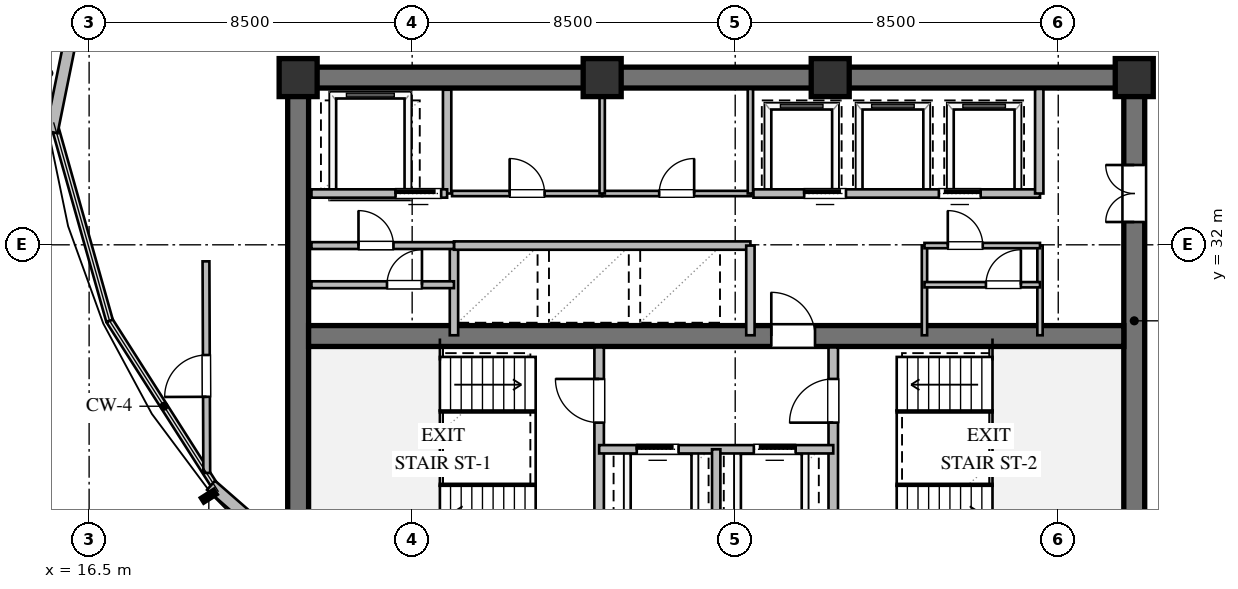
"""IFC4 building model, lengths in metres.
Left out: names, types, materials, properties, quantities, classifications, styles, units other than length and angle.
Written with IfcOpenShell. Run it as: python <this file> out.ifc"""

import sys

from ifc_helpers import new_model, si_unit, direction, frame, frame_2d, origin, origin_2d, place, context, subcontext, project, spatial, rectangle, extrude, element, fill, save


model = new_model("IFC4")
c1 = context("Model", 3, precision=1e-05, world=origin(), true_north=direction((0.0, 1.0)))
c2 = subcontext(c1, "Body", "Model", "MODEL_VIEW")
j1 = project(units=[si_unit("LENGTHUNIT", "METRE"), si_unit("PLANEANGLEUNIT", "RADIAN")], contexts=[c1])
p1 = place(None, origin())
s1 = spatial("IfcSite", under=j1, at=p1, CompositionType="ELEMENT")
p2 = place(p1, origin())
s2 = spatial("IfcBuilding", under=s1, at=p2, CompositionType="ELEMENT")
p3 = place(p2, frame((0.0, 0.0, 135.0)))
s3 = spatial("IfcBuildingStorey", under=s2, at=p3, CompositionType="ELEMENT", Elevation=135.0)
p4 = place(p3, frame((21.725, 36.4, 0.0), z_axis=(0.0, 0.0, 1.0), x_axis=(1.0, 0.0, 0.0)))
e1 = element("IfcWall", 1, at=p4, inside=s3, PredefinedType="SHEAR", context=c2, shape_type="SweptSolid", body=[
    extrude(rectangle(XDim=22.55, YDim=0.55, at=frame_2d((11.275, 0.0))), origin(), (0.0, 0.0, 1.0), 3.36),
])
p5 = place(p3, frame((22.0, 23.875, 0.0), z_axis=(0.0, 0.0, 1.0), x_axis=(0.0, 1.0, 0.0)))
e2 = element("IfcWall", 2, at=p5, inside=s3, PredefinedType="SHEAR", context=c2, shape_type="SweptSolid", body=[
    extrude(rectangle(XDim=12.25, YDim=0.55, at=frame_2d((6.125, 0.0))), origin(), (0.0, 0.0, 1.0), 3.36),
])
p6 = place(p3, frame((44.0, 23.875, 0.0), z_axis=(0.0, 0.0, 1.0), x_axis=(0.0, 1.0, 0.0)))
e3 = element("IfcWall", 3, at=p6, inside=s3, PredefinedType="SHEAR", context=c2, shape_type="SweptSolid", body=[
    extrude(rectangle(XDim=12.25, YDim=0.55, at=frame_2d((6.125, 0.0))), origin(), (0.0, 0.0, 1.0), 3.36),
])
p7 = place(p6, frame((8.725, 0.0, 0.0)))
e4 = element("IfcOpeningElement", 4, at=p7, cuts=e3, PredefinedType="OPENING", context=c2, shape_type="SweptSolid", body=[
    extrude(rectangle(XDim=1.5, YDim=2.15, at=frame_2d((0.75, 1.075))), frame((0.0, 0.285, 0.0), z_axis=(0.0, -1.0, 0.0), x_axis=(1.0, 0.0, 0.0)), (0.0, 0.0, 1.0), 0.57),
])
p8 = place(p3, frame((22.275, 29.6, 0.0), z_axis=(0.0, 0.0, 1.0), x_axis=(1.0, 0.0, 0.0)))
e5 = element("IfcWall", 5, at=p8, inside=s3, PredefinedType="SHEAR", context=c2, shape_type="SweptSolid", body=[
    extrude(rectangle(XDim=21.45, YDim=0.55, at=frame_2d((10.725, 0.0))), origin(), (0.0, 0.0, 1.0), 3.36),
])
p9 = place(p8, frame((12.175, 0.0, 0.0)))
e6 = element("IfcOpeningElement", 6, at=p9, cuts=e5, PredefinedType="OPENING", context=c2, shape_type="SweptSolid", body=[
    extrude(rectangle(XDim=1.15, YDim=2.1, at=frame_2d((0.575, 1.05))), frame((0.0, 0.285, 0.0), z_axis=(0.0, -1.0, 0.0), x_axis=(1.0, 0.0, 0.0)), (0.0, 0.0, 1.0), 0.57),
])
for number, where, z_axis, x_axis in (
    (7, (44.0, 36.4, 0.0), (0.0, 0.0, 1.0), (1.0, 0.0, 0.0)),
    (8, (36.0, 36.4, 0.0), (0.0, 0.0, 1.0), (1.0, 0.0, 0.0)),
    (9, (30.0, 36.4, 0.0), (0.0, 0.0, 1.0), (1.0, 0.0, 0.0)),
    (10, (22.0, 36.4, 0.0), (0.0, 0.0, 1.0), (1.0, 0.0, 0.0)),
):
    element("IfcColumn", number, at=place(p3, frame(where, z_axis=z_axis, x_axis=x_axis)), inside=s3, PredefinedType="COLUMN", context=c2, shape_type="SweptSolid", body=[
        extrude(rectangle(XDim=1.0, YDim=1.0, at=origin_2d()), origin(), (0.0, 0.0, 1.0), 3.6),
    ])
p10 = place(p3, frame((24.225, 21.727, 0.0), z_axis=(0.0, 0.0, 1.0), x_axis=(-0.753105964003, 0.657899237713, 0.0)))
e11 = element("IfcWall", 11, at=p10, inside=s3, PredefinedType="STANDARD", context=c2, shape_type="SweptSolid", body=[
    extrude(rectangle(XDim=5.998, YDim=0.32, at=frame_2d((2.999, 0.0))), origin(), (0.0, 0.0, 1.0), 2.35),
])
p11 = place(p3, frame((15.514, 34.967, 0.0), z_axis=(0.0, 0.0, 1.0), x_axis=(0.198370893133, 0.980127026848, 0.0)))
e12 = element("IfcWall", 12, at=p11, inside=s3, PredefinedType="STANDARD", context=c2, shape_type="SweptSolid", body=[
    extrude(rectangle(XDim=14.469, YDim=0.32, at=frame_2d((7.234, 0.0))), origin(), (0.0, 0.0, 1.0), 3.36),
])
p12 = place(p3, frame((29.92, 23.9, 0.0), z_axis=(0.0, 0.0, 1.0), x_axis=(0.0, 1.0, 0.0)))
e13 = element("IfcWall", 13, at=p12, inside=s3, PredefinedType="SOLIDWALL", context=c2, shape_type="SweptSolid", body=[
    extrude(rectangle(XDim=5.4, YDim=0.25, at=frame_2d((2.7, 0.0))), origin(), (0.0, 0.0, 1.0), 2.89),
])
p13 = place(p12, frame((3.421, 0.0, 0.0)))
e14 = element("IfcOpeningElement", 14, at=p13, cuts=e13, PredefinedType="OPENING", context=c2, shape_type="SweptSolid", body=[
    extrude(rectangle(XDim=1.15, YDim=2.1, at=frame_2d((0.575, 1.05))), frame((0.0, 0.135, 0.0), z_axis=(0.0, -1.0, 0.0), x_axis=(1.0, 0.0, 0.0)), (0.0, 0.0, 1.0), 0.27),
])
p14 = place(p3, frame((36.08, 23.9, 0.0), z_axis=(0.0, 0.0, 1.0), x_axis=(0.0, 1.0, 0.0)))
e15 = element("IfcWall", 15, at=p14, inside=s3, PredefinedType="SOLIDWALL", context=c2, shape_type="SweptSolid", body=[
    extrude(rectangle(XDim=5.4, YDim=0.25, at=frame_2d((2.7, 0.0))), origin(), (0.0, 0.0, 1.0), 3.36),
])
p15 = place(p14, frame((3.421, 0.0, 0.0)))
e16 = element("IfcOpeningElement", 16, at=p15, cuts=e15, PredefinedType="OPENING", context=c2, shape_type="SweptSolid", body=[
    extrude(rectangle(XDim=1.15, YDim=2.1, at=frame_2d((0.575, 1.05))), frame((0.0, 0.135, 0.0), z_axis=(0.0, -1.0, 0.0), x_axis=(1.0, 0.0, 0.0)), (0.0, 0.0, 1.0), 0.27),
])
p16 = place(p3, frame((29.92, 26.62, 0.0), z_axis=(0.0, 0.0, 1.0), x_axis=(1.0, 0.0, 0.0)))
e17 = element("IfcWall", 17, at=p16, inside=s3, PredefinedType="SOLIDWALL", context=c2, shape_type="SweptSolid", body=[
    extrude(rectangle(XDim=6.16, YDim=0.22, at=frame_2d((3.08, 0.0))), origin(), (0.0, 0.0, 1.0), 3.36),
])
p17 = place(p16, frame((0.99, 0.0, 0.0)))
e18 = element("IfcOpeningElement", 18, at=p17, cuts=e17, PredefinedType="OPENING", context=c2, shape_type="SweptSolid", body=[
    extrude(rectangle(XDim=1.1, YDim=2.1, at=frame_2d((0.55, 1.05))), frame((0.0, 0.12, 0.0), z_axis=(0.0, -1.0, 0.0), x_axis=(1.0, 0.0, 0.0)), (0.0, 0.0, 1.0), 0.24),
])
p18 = place(p16, frame((4.07, 0.0, 0.0)))
e19 = element("IfcOpeningElement", 19, at=p18, cuts=e17, PredefinedType="OPENING", context=c2, shape_type="SweptSolid", body=[
    extrude(rectangle(XDim=1.1, YDim=2.1, at=frame_2d((0.55, 1.05))), frame((0.0, 0.12, 0.0), z_axis=(0.0, -1.0, 0.0), x_axis=(1.0, 0.0, 0.0)), (0.0, 0.0, 1.0), 0.24),
])
p19 = place(p3, frame((33.0, 23.9, 0.0), z_axis=(0.0, 0.0, 1.0), x_axis=(0.0, 1.0, 0.0)))
e20 = element("IfcWall", 20, at=p19, inside=s3, PredefinedType="SOLIDWALL", context=c2, shape_type="SweptSolid", body=[
    extrude(rectangle(XDim=2.72, YDim=0.22, at=frame_2d((1.36, 0.0))), origin(), (0.0, 0.0, 1.0), 3.36),
])
p20 = place(p3, frame((25.92, 33.35, 0.0), z_axis=(0.0, 0.0, 1.0), x_axis=(0.0, 1.0, 0.0)))
e21 = element("IfcWall", 21, at=p20, inside=s3, PredefinedType="SOLIDWALL", context=c2, shape_type="SweptSolid", body=[
    extrude(rectangle(XDim=2.73, YDim=0.22, at=frame_2d((1.365, 0.0))), origin(), (0.0, 0.0, 1.0), 3.36),
])
p21 = place(p3, frame((22.35, 33.35, 0.0), z_axis=(0.0, 0.0, 1.0), x_axis=(1.0, 0.0, 0.0)))
e22 = element("IfcWall", 22, at=p21, inside=s3, PredefinedType="SOLIDWALL", context=c2, shape_type="SweptSolid", body=[
    extrude(rectangle(XDim=3.57, YDim=0.22, at=frame_2d((1.785, 0.0))), origin(), (0.0, 0.0, 1.0), 3.36),
])
p22 = place(p21, frame((2.213, 0.0, 0.0)))
e23 = element("IfcOpeningElement", 23, at=p22, cuts=e22, PredefinedType="OPENING", context=c2, shape_type="SweptSolid", body=[
    extrude(rectangle(XDim=1.2, YDim=2.1, at=frame_2d((0.6, 1.05))), frame((0.0, 0.12, 0.0), z_axis=(0.0, -1.0, 0.0), x_axis=(1.0, 0.0, 0.0)), (0.0, 0.0, 1.0), 0.24),
])
p23 = place(p3, frame((26.1, 29.62, 0.0), z_axis=(0.0, 0.0, 1.0), x_axis=(0.0, 1.0, 0.0)))
e24 = element("IfcWall", 24, at=p23, inside=s3, PredefinedType="SOLIDWALL", context=c2, shape_type="SweptSolid", body=[
    extrude(rectangle(XDim=2.36, YDim=0.22, at=frame_2d((1.18, 0.0))), origin(), (0.0, 0.0, 1.0), 3.36),
])
p24 = place(p3, frame((26.1, 31.98, 0.0), z_axis=(0.0, 0.0, 1.0), x_axis=(1.0, 0.0, 0.0)))
e25 = element("IfcWall", 25, at=p24, inside=s3, PredefinedType="SOLIDWALL", context=c2, shape_type="SweptSolid", body=[
    extrude(rectangle(XDim=7.8, YDim=0.22, at=frame_2d((3.9, 0.0))), origin(), (0.0, 0.0, 1.0), 3.36),
])
p25 = place(p3, frame((33.9, 29.62, 0.0), z_axis=(0.0, 0.0, 1.0), x_axis=(0.0, 1.0, 0.0)))
e26 = element("IfcWall", 26, at=p25, inside=s3, PredefinedType="SOLIDWALL", context=c2, shape_type="SweptSolid", body=[
    extrude(rectangle(XDim=2.36, YDim=0.22, at=frame_2d((1.18, 0.0))), origin(), (0.0, 0.0, 1.0), 3.36),
])
p26 = place(p3, frame((26.05, 33.35, 0.0), z_axis=(0.0, 0.0, 1.0), x_axis=(1.0, 0.0, 0.0)))
e27 = element("IfcWall", 27, at=p26, inside=s3, PredefinedType="PARTITIONING", context=c2, shape_type="SweptSolid", body=[
    extrude(rectangle(XDim=3.95, YDim=0.14, at=frame_2d((1.975, 0.0))), origin(), (0.0, 0.0, 1.0), 3.36),
])
p27 = place(p26, frame((1.515, 0.0, 0.0)))
e28 = element("IfcOpeningElement", 28, at=p27, cuts=e27, PredefinedType="OPENING", context=c2, shape_type="SweptSolid", body=[
    extrude(rectangle(XDim=0.92, YDim=2.1, at=frame_2d((0.46, 1.05))), frame((0.0, 0.08, 0.0), z_axis=(0.0, -1.0, 0.0), x_axis=(1.0, 0.0, 0.0)), (0.0, 0.0, 1.0), 0.16),
])
p28 = place(p3, frame((30.0, 33.35, 0.0), z_axis=(0.0, 0.0, 1.0), x_axis=(1.0, 0.0, 0.0)))
e29 = element("IfcWall", 29, at=p28, inside=s3, PredefinedType="PARTITIONING", context=c2, shape_type="SweptSolid", body=[
    extrude(rectangle(XDim=3.92, YDim=0.14, at=frame_2d((1.96, 0.0))), origin(), (0.0, 0.0, 1.0), 3.36),
])
p29 = place(p28, frame((1.5, 0.0, 0.0)))
e30 = element("IfcOpeningElement", 30, at=p29, cuts=e29, PredefinedType="OPENING", context=c2, shape_type="SweptSolid", body=[
    extrude(rectangle(XDim=0.92, YDim=2.1, at=frame_2d((0.46, 1.05))), frame((0.0, 0.08, 0.0), z_axis=(0.0, -1.0, 0.0), x_axis=(1.0, 0.0, 0.0)), (0.0, 0.0, 1.0), 0.16),
])
for number, where, z_axis, x_axis in (
    (31, (30.0, 33.35, 0.0), (0.0, 0.0, 1.0), (0.0, 1.0, 0.0)),
    (32, (33.9, 33.35, 0.0), (0.0, 0.0, 1.0), (0.0, 1.0, 0.0)),
):
    element("IfcWall", number, at=place(p3, frame(where, z_axis=z_axis, x_axis=x_axis)), inside=s3, PredefinedType="PARTITIONING", context=c2, shape_type="SweptSolid", body=[
        extrude(rectangle(XDim=2.75, YDim=0.14, at=frame_2d((1.375, 0.0))), origin(), (0.0, 0.0, 1.0), 3.36),
    ])
p30 = place(p3, frame((33.98, 33.35, 0.0), z_axis=(0.0, 0.0, 1.0), x_axis=(1.0, 0.0, 0.0)))
e33 = element("IfcWall", 33, at=p30, inside=s3, PredefinedType="SOLIDWALL", context=c2, shape_type="SweptSolid", body=[
    extrude(rectangle(XDim=7.54, YDim=0.22, at=frame_2d((3.77, 0.0))), origin(), (0.0, 0.0, 1.0), 3.36),
])
p31 = place(p30, frame((1.335, 0.0, 0.0)))
e34 = element("IfcOpeningElement", 34, at=p31, cuts=e33, PredefinedType="OPENING", context=c2, shape_type="SweptSolid", body=[
    extrude(rectangle(XDim=1.1, YDim=2.1, at=frame_2d((0.55, 1.05))), frame((0.0, 0.12, 0.0), z_axis=(0.0, -1.0, 0.0), x_axis=(1.0, 0.0, 0.0)), (0.0, 0.0, 1.0), 0.24),
])
p32 = place(p30, frame((4.879, 0.0, 0.0)))
e35 = element("IfcOpeningElement", 35, at=p32, cuts=e33, PredefinedType="OPENING", context=c2, shape_type="SweptSolid", body=[
    extrude(rectangle(XDim=1.1, YDim=2.1, at=frame_2d((0.55, 1.05))), frame((0.0, 0.12, 0.0), z_axis=(0.0, -1.0, 0.0), x_axis=(1.0, 0.0, 0.0)), (0.0, 0.0, 1.0), 0.24),
])
p33 = place(p3, frame((41.5, 33.35, 0.0), z_axis=(0.0, 0.0, 1.0), x_axis=(0.0, 1.0, 0.0)))
e36 = element("IfcWall", 36, at=p33, inside=s3, PredefinedType="SOLIDWALL", context=c2, shape_type="SweptSolid", body=[
    extrude(rectangle(XDim=2.75, YDim=0.22, at=frame_2d((1.375, 0.0))), origin(), (0.0, 0.0, 1.0), 3.36),
])
p34 = place(p3, frame((22.35, 30.95, 0.0), z_axis=(0.0, 0.0, 1.0), x_axis=(1.0, 0.0, 0.0)))
e37 = element("IfcWall", 37, at=p34, inside=s3, PredefinedType="PARTITIONING", context=c2, shape_type="SweptSolid", body=[
    extrude(rectangle(XDim=3.75, YDim=0.18, at=frame_2d((1.875, 0.0))), origin(), (0.0, 0.0, 1.0), 3.36),
])
p35 = place(p34, frame((1.988, 0.0, 0.0)))
e38 = element("IfcOpeningElement", 38, at=p35, cuts=e37, PredefinedType="OPENING", context=c2, shape_type="SweptSolid", body=[
    extrude(rectangle(XDim=0.92, YDim=2.1, at=frame_2d((0.46, 1.05))), frame((0.0, 0.1, 0.0), z_axis=(0.0, -1.0, 0.0), x_axis=(1.0, 0.0, 0.0)), (0.0, 0.0, 1.0), 0.2),
])
p36 = place(p3, frame((22.35, 31.98, 0.0), z_axis=(0.0, 0.0, 1.0), x_axis=(1.0, 0.0, 0.0)))
e39 = element("IfcWall", 39, at=p36, inside=s3, PredefinedType="PARTITIONING", context=c2, shape_type="SweptSolid", body=[
    extrude(rectangle(XDim=3.75, YDim=0.18, at=frame_2d((1.875, 0.0))), origin(), (0.0, 0.0, 1.0), 3.36),
])
p37 = place(p36, frame((1.238, 0.0, 0.0)))
e40 = element("IfcOpeningElement", 40, at=p37, cuts=e39, PredefinedType="OPENING", context=c2, shape_type="SweptSolid", body=[
    extrude(rectangle(XDim=0.92, YDim=2.1, at=frame_2d((0.46, 1.05))), frame((0.0, 0.1, 0.0), z_axis=(0.0, -1.0, 0.0), x_axis=(1.0, 0.0, 0.0)), (0.0, 0.0, 1.0), 0.2),
])
for number, where, z_axis, x_axis in (
    (41, (38.48, 29.62, 0.0), (0.0, 0.0, 1.0), (0.0, 1.0, 0.0)),
    (42, (41.52, 29.62, 0.0), (0.0, 0.0, 1.0), (0.0, 1.0, 0.0)),
):
    element("IfcWall", number, at=place(p3, frame(where, z_axis=z_axis, x_axis=x_axis)), inside=s3, PredefinedType="PARTITIONING", context=c2, shape_type="SweptSolid", body=[
        extrude(rectangle(XDim=2.36, YDim=0.14, at=frame_2d((1.18, 0.0))), origin(), (0.0, 0.0, 1.0), 3.36),
    ])
p38 = place(p3, frame((38.48, 30.95, 0.0), z_axis=(0.0, 0.0, 1.0), x_axis=(1.0, 0.0, 0.0)))
e43 = element("IfcWall", 43, at=p38, inside=s3, PredefinedType="PARTITIONING", context=c2, shape_type="SweptSolid", body=[
    extrude(rectangle(XDim=3.04, YDim=0.14, at=frame_2d((1.52, 0.0))), origin(), (0.0, 0.0, 1.0), 3.36),
])
p39 = place(p38, frame((1.617, 0.0, 0.0)))
e44 = element("IfcOpeningElement", 44, at=p39, cuts=e43, PredefinedType="OPENING", context=c2, shape_type="SweptSolid", body=[
    extrude(rectangle(XDim=0.92, YDim=2.1, at=frame_2d((0.46, 1.05))), frame((0.0, 0.08, 0.0), z_axis=(0.0, -1.0, 0.0), x_axis=(1.0, 0.0, 0.0)), (0.0, 0.0, 1.0), 0.16),
])
p40 = place(p3, frame((38.48, 31.98, 0.0), z_axis=(0.0, 0.0, 1.0), x_axis=(1.0, 0.0, 0.0)))
e45 = element("IfcWall", 45, at=p40, inside=s3, PredefinedType="PARTITIONING", context=c2, shape_type="SweptSolid", body=[
    extrude(rectangle(XDim=3.04, YDim=0.14, at=frame_2d((1.52, 0.0))), origin(), (0.0, 0.0, 1.0), 3.36),
])
p41 = place(p40, frame((0.614, 0.0, 0.0)))
e46 = element("IfcOpeningElement", 46, at=p41, cuts=e45, PredefinedType="OPENING", context=c2, shape_type="SweptSolid", body=[
    extrude(rectangle(XDim=0.92, YDim=2.1, at=frame_2d((0.46, 1.05))), frame((0.0, 0.08, 0.0), z_axis=(0.0, -1.0, 0.0), x_axis=(1.0, 0.0, 0.0)), (0.0, 0.0, 1.0), 0.16),
])
p42 = place(p3, frame((19.595, 25.997, 0.0), z_axis=(0.0, 0.0, 1.0), x_axis=(-0.003639049913, 0.999993378636, 0.0)))
e47 = element("IfcWall", 47, at=p42, inside=s3, PredefinedType="PARTITIONING", context=c2, shape_type="SweptSolid", body=[
    extrude(rectangle(XDim=5.568, YDim=0.18, at=frame_2d((2.784, 0.0))), origin(), (0.0, 0.0, 1.0), 2.657),
])
p43 = place(p42, frame((2.004, 0.0, 0.0)))
e48 = element("IfcOpeningElement", 48, at=p43, cuts=e47, PredefinedType="OPENING", context=c2, shape_type="SweptSolid", body=[
    extrude(rectangle(XDim=1.1, YDim=2.1, at=frame_2d((0.55, 1.05))), frame((0.0, 0.1, 0.0), z_axis=(0.0, -1.0, 0.0), x_axis=(1.0, 0.0, 0.0)), (0.0, 0.0, 1.0), 0.2),
])
p44 = place(p13, origin())
e49 = element("IfcDoor", 49, at=p44, inside=s3, OperationType="SINGLE_SWING_RIGHT", PredefinedType="DOOR", context=c2, shape_type="SweptSolid", body=[
    extrude(rectangle(XDim=1.15, YDim=2.1, at=frame_2d((0.575, 1.05))), frame((0.0, 0.025, 0.0), z_axis=(0.0, -1.0, 0.0), x_axis=(1.0, 0.0, 0.0)), (0.0, 0.0, 1.0), 0.05),
])
fill(e14, e49)
p45 = place(p15, origin())
e50 = element("IfcDoor", 50, at=p45, inside=s3, OperationType="SINGLE_SWING_LEFT", PredefinedType="DOOR", context=c2, shape_type="SweptSolid", body=[
    extrude(rectangle(XDim=1.15, YDim=2.1, at=frame_2d((0.575, 1.05))), frame((0.0, 0.025, 0.0), z_axis=(0.0, -1.0, 0.0), x_axis=(1.0, 0.0, 0.0)), (0.0, 0.0, 1.0), 0.05),
])
fill(e16, e50)
p46 = place(p17, origin())
e51 = element("IfcDoor", 51, at=p46, inside=s3, OperationType="SLIDING_TO_LEFT", PredefinedType="DOOR", context=c2, shape_type="SweptSolid", body=[
    extrude(rectangle(XDim=1.1, YDim=2.1, at=frame_2d((0.55, 1.05))), frame((0.0, 0.025, 0.0), z_axis=(0.0, -1.0, 0.0), x_axis=(1.0, 0.0, 0.0)), (0.0, 0.0, 1.0), 0.05),
])
fill(e18, e51)
p47 = place(p18, origin())
e52 = element("IfcDoor", 52, at=p47, inside=s3, OperationType="SLIDING_TO_RIGHT", PredefinedType="DOOR", context=c2, shape_type="SweptSolid", body=[
    extrude(rectangle(XDim=1.1, YDim=2.1, at=frame_2d((0.55, 1.05))), frame((0.0, 0.025, 0.0), z_axis=(0.0, -1.0, 0.0), x_axis=(1.0, 0.0, 0.0)), (0.0, 0.0, 1.0), 0.05),
])
fill(e19, e52)
p48 = place(p9, origin())
e53 = element("IfcDoor", 53, at=p48, inside=s3, OperationType="SINGLE_SWING_LEFT", PredefinedType="DOOR", context=c2, shape_type="SweptSolid", body=[
    extrude(rectangle(XDim=1.15, YDim=2.1, at=frame_2d((0.575, 1.05))), frame((0.0, 0.025, 0.0), z_axis=(0.0, -1.0, 0.0), x_axis=(1.0, 0.0, 0.0)), (0.0, 0.0, 1.0), 0.05),
])
fill(e6, e53)
p49 = place(p7, origin())
e54 = element("IfcDoor", 54, at=p49, inside=s3, OperationType="DOUBLE_DOOR_SINGLE_SWING", PredefinedType="DOOR", context=c2, shape_type="SweptSolid", body=[
    extrude(rectangle(XDim=1.5, YDim=2.15, at=frame_2d((0.75, 1.075))), frame((0.0, 0.025, 0.0), z_axis=(0.0, -1.0, 0.0), x_axis=(1.0, 0.0, 0.0)), (0.0, 0.0, 1.0), 0.05),
])
fill(e4, e54)
p50 = place(p22, origin())
e55 = element("IfcDoor", 55, at=p50, inside=s3, OperationType="SLIDING_TO_LEFT", PredefinedType="DOOR", context=c2, shape_type="SweptSolid", body=[
    extrude(rectangle(XDim=1.2, YDim=2.1, at=frame_2d((0.6, 1.05))), frame((0.0, 0.025, 0.0), z_axis=(0.0, -1.0, 0.0), x_axis=(1.0, 0.0, 0.0)), (0.0, 0.0, 1.0), 0.05),
])
fill(e23, e55)
p51 = place(p27, origin())
e56 = element("IfcDoor", 56, at=p51, inside=s3, OperationType="SINGLE_SWING_LEFT", PredefinedType="DOOR", context=c2, shape_type="SweptSolid", body=[
    extrude(rectangle(XDim=0.92, YDim=2.1, at=frame_2d((0.46, 1.05))), frame((0.0, 0.025, 0.0), z_axis=(0.0, -1.0, 0.0), x_axis=(1.0, 0.0, 0.0)), (0.0, 0.0, 1.0), 0.05),
])
fill(e28, e56)
p52 = place(p29, origin())
e57 = element("IfcDoor", 57, at=p52, inside=s3, OperationType="SINGLE_SWING_RIGHT", PredefinedType="DOOR", context=c2, shape_type="SweptSolid", body=[
    extrude(rectangle(XDim=0.92, YDim=2.1, at=frame_2d((0.46, 1.05))), frame((0.0, 0.025, 0.0), z_axis=(0.0, -1.0, 0.0), x_axis=(1.0, 0.0, 0.0)), (0.0, 0.0, 1.0), 0.05),
])
fill(e30, e57)
p53 = place(p31, origin())
e58 = element("IfcDoor", 58, at=p53, inside=s3, OperationType="SLIDING_TO_LEFT", PredefinedType="DOOR", context=c2, shape_type="SweptSolid", body=[
    extrude(rectangle(XDim=1.1, YDim=2.1, at=frame_2d((0.55, 1.05))), frame((0.0, 0.025, 0.0), z_axis=(0.0, -1.0, 0.0), x_axis=(1.0, 0.0, 0.0)), (0.0, 0.0, 1.0), 0.05),
])
fill(e34, e58)
p54 = place(p32, origin())
e59 = element("IfcDoor", 59, at=p54, inside=s3, OperationType="SLIDING_TO_RIGHT", PredefinedType="DOOR", context=c2, shape_type="SweptSolid", body=[
    extrude(rectangle(XDim=1.1, YDim=2.1, at=frame_2d((0.55, 1.05))), frame((0.0, 0.025, 0.0), z_axis=(0.0, -1.0, 0.0), x_axis=(1.0, 0.0, 0.0)), (0.0, 0.0, 1.0), 0.05),
])
fill(e35, e59)
p55 = place(p37, origin())
e60 = element("IfcDoor", 60, at=p55, inside=s3, OperationType="SINGLE_SWING_LEFT", PredefinedType="DOOR", context=c2, shape_type="SweptSolid", body=[
    extrude(rectangle(XDim=0.92, YDim=2.1, at=frame_2d((0.46, 1.05))), frame((0.0, 0.025, 0.0), z_axis=(0.0, -1.0, 0.0), x_axis=(1.0, 0.0, 0.0)), (0.0, 0.0, 1.0), 0.05),
])
fill(e40, e60)
p56 = place(p35, origin())
e61 = element("IfcDoor", 61, at=p56, inside=s3, OperationType="SINGLE_SWING_RIGHT", PredefinedType="DOOR", context=c2, shape_type="SweptSolid", body=[
    extrude(rectangle(XDim=0.92, YDim=2.1, at=frame_2d((0.46, 1.05))), frame((0.0, 0.025, 0.0), z_axis=(0.0, -1.0, 0.0), x_axis=(1.0, 0.0, 0.0)), (0.0, 0.0, 1.0), 0.05),
])
fill(e38, e61)
p57 = place(p41, origin())
e62 = element("IfcDoor", 62, at=p57, inside=s3, OperationType="SINGLE_SWING_LEFT", PredefinedType="DOOR", context=c2, shape_type="SweptSolid", body=[
    extrude(rectangle(XDim=0.92, YDim=2.1, at=frame_2d((0.46, 1.05))), frame((0.0, 0.025, 0.0), z_axis=(0.0, -1.0, 0.0), x_axis=(1.0, 0.0, 0.0)), (0.0, 0.0, 1.0), 0.05),
])
fill(e46, e62)
p58 = place(p39, origin())
e63 = element("IfcDoor", 63, at=p58, inside=s3, OperationType="SINGLE_SWING_RIGHT", PredefinedType="DOOR", context=c2, shape_type="SweptSolid", body=[
    extrude(rectangle(XDim=0.92, YDim=2.1, at=frame_2d((0.46, 1.05))), frame((0.0, 0.025, 0.0), z_axis=(0.0, -1.0, 0.0), x_axis=(1.0, 0.0, 0.0)), (0.0, 0.0, 1.0), 0.05),
])
fill(e44, e63)
p59 = place(p43, origin())
e64 = element("IfcDoor", 64, at=p59, inside=s3, OperationType="SINGLE_SWING_LEFT", PredefinedType="DOOR", context=c2, shape_type="SweptSolid", body=[
    extrude(rectangle(XDim=1.1, YDim=2.1, at=frame_2d((0.55, 1.05))), frame((0.0, 0.025, 0.0), z_axis=(0.0, -1.0, 0.0), x_axis=(1.0, 0.0, 0.0)), (0.0, 0.0, 1.0), 0.05),
])
fill(e48, e64)
save(model, sys.argv[1])
